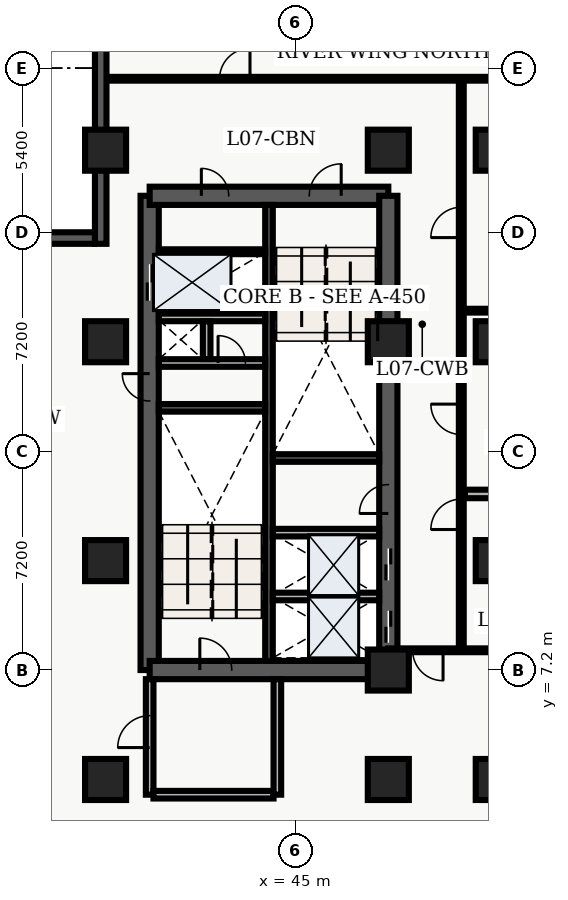
"""IFC4 building model, lengths in metres.
Left out: names, types, materials, properties, quantities, classifications, styles, units other than length and angle.
Written with IfcOpenShell. Run it as: python <this file> out.ifc"""

import sys

from ifc_helpers import new_model, entity, si_unit, converted_unit, direction, frame, origin_with_axes, origin_2d_with_axis, place, context, subcontext, project, spatial, polyline, rectangle, outline, extrude, element, fill, save


model = new_model("IFC4")
c1 = context("Model", 3, precision=1e-05, world=origin_with_axes(), true_north=direction((0.0, 1.0)))
c2 = subcontext(c1, "Body", "Model", "MODEL_VIEW")
j1 = project(units=[si_unit("LENGTHUNIT", "METRE"), converted_unit("PLANEANGLEUNIT", "DEGREE", entity("IfcPlaneAngleMeasure", 0.017), si_unit("PLANEANGLEUNIT", "RADIAN"), dimensions=[0, 0, 0, 0, 0, 0, 0])], contexts=[c1])
p1 = place(None, origin_with_axes())
s1 = spatial("IfcSite", under=j1, at=p1, CompositionType="ELEMENT")
p2 = place(p1, origin_with_axes())
s2 = spatial("IfcBuilding", under=s1, at=p2, CompositionType="ELEMENT")
p3 = place(p2, frame((0.0, 0.0, 32.7), z_axis=(0.0, 0.0, 1.0), x_axis=(1.0, 0.0, 0.0)))
s3 = spatial("IfcBuildingStorey", under=s2, at=p3, CompositionType="ELEMENT", Elevation=32.7)
p4 = place(p3, frame((40.2, 7.2, 0.0), z_axis=(0.0, 0.0, 1.0), x_axis=(0.0, 1.0, 0.0)))
e1 = element("IfcWall", 1, at=p4, inside=s3, PredefinedType="SHEAR", context=c2, shape_type="SweptSolid", body=[
    extrude(outline(polyline([(0.0, -0.3), (15.6, -0.3), (15.6, 0.3), (0.0, 0.3), (0.0, -0.3)])), origin_with_axes(), (0.0, 0.0, 1.0), 3.66),
])
p5 = place(p4, frame((12.75, 0.0, 0.0), z_axis=(0.0, 0.0, 1.0), x_axis=(1.0, 0.0, 0.0)))
e2 = element("IfcOpeningElement", 2, at=p5, cuts=e1, PredefinedType="OPENING", context=c2, shape_type="SweptSolid", body=[
    extrude(rectangle(XDim=1.2, YDim=0.62, at=origin_2d_with_axis()), origin_with_axes(), (0.0, 0.0, 1.0), 2.15),
])
p6 = place(p4, frame((9.3, 0.0, 0.0), z_axis=(0.0, 0.0, 1.0), x_axis=(1.0, 0.0, 0.0)))
e3 = element("IfcOpeningElement", 3, at=p6, cuts=e1, PredefinedType="OPENING", context=c2, shape_type="SweptSolid", body=[
    extrude(rectangle(XDim=0.9, YDim=0.62, at=origin_2d_with_axis()), origin_with_axes(), (0.0, 0.0, 1.0), 2.15),
])
p7 = place(p3, frame((40.2, 7.2, 0.0), z_axis=(0.0, 0.0, 1.0), x_axis=(1.0, 0.0, 0.0)))
e4 = element("IfcWall", 4, at=p7, inside=s3, PredefinedType="SHEAR", context=c2, shape_type="SweptSolid", body=[
    extrude(outline(polyline([(0.0, -0.3), (7.85, -0.3), (7.85, 0.3), (0.0, 0.3), (0.0, -0.3)])), origin_with_axes(), (0.0, 0.0, 1.0), 3.66),
])
p8 = place(p7, frame((2.175, 0.0, 0.0), z_axis=(0.0, 0.0, 1.0), x_axis=(1.0, 0.0, 0.0)))
e5 = element("IfcOpeningElement", 5, at=p8, cuts=e4, PredefinedType="OPENING", context=c2, shape_type="SweptSolid", body=[
    extrude(rectangle(XDim=1.05, YDim=0.62, at=origin_2d_with_axis()), origin_with_axes(), (0.0, 0.0, 1.0), 2.15),
])
p9 = place(p3, frame((40.2, 22.8, 0.0), z_axis=(0.0, 0.0, 1.0), x_axis=(1.0, 0.0, 0.0)))
e6 = element("IfcWall", 6, at=p9, inside=s3, PredefinedType="SHEAR", context=c2, shape_type="SweptSolid", body=[
    extrude(outline(polyline([(0.0, -0.3), (7.85, -0.3), (7.85, 0.3), (0.0, 0.3), (0.0, -0.3)])), origin_with_axes(), (0.0, 0.0, 1.0), 3.66),
])
p10 = place(p9, frame((5.775, 0.0, 0.0), z_axis=(0.0, 0.0, 1.0), x_axis=(1.0, 0.0, 0.0)))
e7 = element("IfcOpeningElement", 7, at=p10, cuts=e6, PredefinedType="OPENING", context=c2, shape_type="SweptSolid", body=[
    extrude(rectangle(XDim=1.05, YDim=0.62, at=origin_2d_with_axis()), origin_with_axes(), (0.0, 0.0, 1.0), 2.15),
])
p11 = place(p9, frame((2.15, 0.0, 0.0), z_axis=(0.0, 0.0, 1.0), x_axis=(1.0, 0.0, 0.0)))
e8 = element("IfcOpeningElement", 8, at=p11, cuts=e6, PredefinedType="OPENING", context=c2, shape_type="SweptSolid", body=[
    extrude(rectangle(XDim=0.9, YDim=0.62, at=origin_2d_with_axis()), origin_with_axes(), (0.0, 0.0, 1.0), 2.15),
])
p12 = place(p3, frame((48.05, 7.2, 0.0), z_axis=(0.0, 0.0, 1.0), x_axis=(0.0, 1.0, 0.0)))
e9 = element("IfcWall", 9, at=p12, inside=s3, PredefinedType="SHEAR", context=c2, shape_type="SweptSolid", body=[
    extrude(outline(polyline([(0.0, -0.3), (15.6, -0.3), (15.6, 0.3), (0.0, 0.3), (0.0, -0.3)])), origin_with_axes(), (0.0, 0.0, 1.0), 3.66),
])
p13 = place(p12, frame((1.425, 0.0, 0.0), z_axis=(0.0, 0.0, 1.0), x_axis=(1.0, 0.0, 0.0)))
e10 = element("IfcOpeningElement", 10, at=p13, cuts=e9, PredefinedType="OPENING", context=c2, shape_type="SweptSolid", body=[
    extrude(rectangle(XDim=1.05, YDim=0.62, at=origin_2d_with_axis()), origin_with_axes(), (0.0, 0.0, 1.0), 2.15),
])
p14 = place(p12, frame((3.475, 0.0, 0.0), z_axis=(0.0, 0.0, 1.0), x_axis=(1.0, 0.0, 0.0)))
e11 = element("IfcOpeningElement", 11, at=p14, cuts=e9, PredefinedType="OPENING", context=c2, shape_type="SweptSolid", body=[
    extrude(rectangle(XDim=1.05, YDim=0.62, at=origin_2d_with_axis()), origin_with_axes(), (0.0, 0.0, 1.0), 2.15),
])
p15 = place(p12, frame((5.625, 0.0, 0.0), z_axis=(0.0, 0.0, 1.0), x_axis=(1.0, 0.0, 0.0)))
e12 = element("IfcOpeningElement", 12, at=p15, cuts=e9, PredefinedType="OPENING", context=c2, shape_type="SweptSolid", body=[
    extrude(rectangle(XDim=0.95, YDim=0.62, at=origin_2d_with_axis()), origin_with_axes(), (0.0, 0.0, 1.0), 2.15),
])
p16 = place(p3, frame((44.125, 7.5, 0.0), z_axis=(0.0, 0.0, 1.0), x_axis=(0.0, 1.0, 0.0)))
e13 = element("IfcWall", 13, at=p16, inside=s3, PredefinedType="SHEAR", context=c2, shape_type="SweptSolid", body=[
    extrude(outline(polyline([(0.0, -0.125), (15.0, -0.125), (15.0, 0.125), (0.0, 0.125), (0.0, -0.125)])), origin_with_axes(), (0.0, 0.0, 1.0), 3.66),
])
for number, where, z_axis, x_axis in (
    (14, (40.5, 15.825, 0.0), (0.0, 0.0, 1.0), (1.0, 0.0, 0.0)),
    (15, (44.25, 14.175, 0.0), (0.0, 0.0, 1.0), (1.0, 0.0, 0.0)),
):
    element("IfcWall", number, at=place(p3, frame(where, z_axis=z_axis, x_axis=x_axis)), inside=s3, PredefinedType="SHEAR", context=c2, shape_type="SweptSolid", body=[
        extrude(outline(polyline([(0.0, -0.125), (3.5, -0.125), (3.5, 0.125), (0.0, 0.125), (0.0, -0.125)])), origin_with_axes(), (0.0, 0.0, 1.0), 3.66),
    ])
p17 = place(p3, frame((40.5, 17.3, 0.0), z_axis=(0.0, 0.0, 1.0), x_axis=(1.0, 0.0, 0.0)))
e16 = element("IfcWall", 16, at=p17, inside=s3, PredefinedType="SOLIDWALL", context=c2, shape_type="SweptSolid", body=[
    extrude(outline(polyline([(0.0, -0.125), (3.5, -0.125), (3.5, 0.125), (0.0, 0.125), (0.0, -0.125)])), origin_with_axes(), (0.0, 0.0, 1.0), 2.7),
])
p18 = place(p17, frame((2.4, 0.0, 0.0), z_axis=(0.0, 0.0, 1.0), x_axis=(1.0, 0.0, 0.0)))
e17 = element("IfcOpeningElement", 17, at=p18, cuts=e16, PredefinedType="OPENING", context=c2, shape_type="SweptSolid", body=[
    extrude(rectangle(XDim=0.9, YDim=0.27, at=origin_2d_with_axis()), origin_with_axes(), (0.0, 0.0, 1.0), 2.15),
])
p19 = place(p3, frame((40.5, 18.8, 0.0), z_axis=(0.0, 0.0, 1.0), x_axis=(1.0, 0.0, 0.0)))
e18 = element("IfcWall", 18, at=p19, inside=s3, PredefinedType="SOLIDWALL", context=c2, shape_type="SweptSolid", body=[
    extrude(outline(polyline([(0.0, -0.125), (3.5, -0.125), (3.5, 0.125), (0.0, 0.125), (0.0, -0.125)])), origin_with_axes(), (0.0, 0.0, 1.0), 2.7),
])
p20 = place(p3, frame((42.075, 17.43, 0.0), z_axis=(0.0, 0.0, 1.0), x_axis=(0.0, 1.0, 0.0)))
e19 = element("IfcWall", 19, at=p20, inside=s3, PredefinedType="SOLIDWALL", context=c2, shape_type="SweptSolid", body=[
    extrude(outline(polyline([(0.0, -0.125), (1.24, -0.125), (1.24, 0.125), (0.0, 0.125), (0.0, -0.125)])), origin_with_axes(), (0.0, 0.0, 1.0), 2.7),
])
p21 = place(p3, frame((40.2, 3.1, 0.0), z_axis=(0.0, 0.0, 1.0), x_axis=(0.0, 1.0, 0.0)))
e20 = element("IfcWall", 20, at=p21, inside=s3, PredefinedType="SOLIDWALL", context=c2, shape_type="SweptSolid", body=[
    extrude(outline(polyline([(0.0, -0.125), (3.8, -0.125), (3.8, 0.125), (0.0, 0.125), (0.0, -0.125)])), origin_with_axes(), (0.0, 0.0, 1.0), 2.7),
])
p22 = place(p21, frame((2.075, 0.0, 0.0), z_axis=(0.0, 0.0, 1.0), x_axis=(1.0, 0.0, 0.0)))
e21 = element("IfcOpeningElement", 21, at=p22, cuts=e20, PredefinedType="OPENING", context=c2, shape_type="SweptSolid", body=[
    extrude(rectangle(XDim=1.05, YDim=0.27, at=origin_2d_with_axis()), origin_with_axes(), (0.0, 0.0, 1.0), 2.15),
])
p23 = place(p3, frame((40.325, 3.1, 0.0), z_axis=(0.0, 0.0, 1.0), x_axis=(1.0, 0.0, 0.0)))
e22 = element("IfcWall", 22, at=p23, inside=s3, PredefinedType="SOLIDWALL", context=c2, shape_type="SweptSolid", body=[
    extrude(outline(polyline([(0.0, -0.125), (3.95, -0.125), (3.95, 0.125), (0.0, 0.125), (0.0, -0.125)])), origin_with_axes(), (0.0, 0.0, 1.0), 2.7),
])
p24 = place(p3, frame((44.4, 3.1, 0.0), z_axis=(0.0, 0.0, 1.0), x_axis=(0.0, 1.0, 0.0)))
e23 = element("IfcWall", 23, at=p24, inside=s3, PredefinedType="SOLIDWALL", context=c2, shape_type="SweptSolid", body=[
    extrude(outline(polyline([(0.0, -0.125), (3.8, -0.125), (3.8, 0.125), (0.0, 0.125), (0.0, -0.125)])), origin_with_axes(), (0.0, 0.0, 1.0), 2.7),
])
for number, where, z_axis, x_axis in (
    (24, (38.75, 3.6, 0.0), (0.0, 0.0, 1.0), (1.0, 0.0, 0.0)),
    (25, (38.75, 10.8, 0.0), (0.0, 0.0, 1.0), (1.0, 0.0, 0.0)),
    (26, (38.75, 18.0, 0.0), (0.0, 0.0, 1.0), (1.0, 0.0, 0.0)),
    (27, (38.75, 24.3, 0.0), (0.0, 0.0, 1.0), (1.0, 0.0, 0.0)),
    (28, (48.05, 3.6, 0.0), (0.0, 0.0, 1.0), (1.0, 0.0, 0.0)),
    (29, (48.05, 7.2, 0.0), (0.0, 0.0, 1.0), (1.0, 0.0, 0.0)),
    (30, (48.05, 18.0, 0.0), (0.0, 0.0, 1.0), (1.0, 0.0, 0.0)),
    (31, (48.05, 24.3, 0.0), (0.0, 0.0, 1.0), (1.0, 0.0, 0.0)),
    (32, (51.6, 3.6, 0.0), (0.0, 0.0, 1.0), (1.0, 0.0, 0.0)),
    (33, (51.6, 10.8, 0.0), (0.0, 0.0, 1.0), (1.0, 0.0, 0.0)),
    (34, (51.6, 18.0, 0.0), (0.0, 0.0, 1.0), (1.0, 0.0, 0.0)),
    (35, (51.6, 24.3, 0.0), (0.0, 0.0, 1.0), (1.0, 0.0, 0.0)),
):
    element("IfcColumn", number, at=place(p3, frame(where, z_axis=z_axis, x_axis=x_axis)), inside=s3, PredefinedType="COLUMN", context=c2, shape_type="SweptSolid", body=[
        extrude(rectangle(XDim=1.35, YDim=1.35, at=origin_2d_with_axis()), origin_with_axes(), (0.0, 0.0, 1.0), 3.9),
    ])
p25 = place(p3, frame((40.5, 20.96, 0.0), z_axis=(0.0, 0.0, 1.0), x_axis=(1.0, 0.0, 0.0)))
e36 = element("IfcWall", 36, at=p25, inside=s3, PredefinedType="PARTITIONING", context=c2, shape_type="SweptSolid", body=[
    extrude(outline(polyline([(0.0, -0.08), (3.5, -0.08), (3.5, 0.08), (0.0, 0.08), (0.0, -0.08)])), origin_with_axes(), (0.0, 0.0, 1.0), 2.7),
])
for number, where, z_axis, x_axis in (
    (37, (44.25, 9.62, 0.0), (0.0, 0.0, 1.0), (1.0, 0.0, 0.0)),
    (38, (44.25, 11.72, 0.0), (0.0, 0.0, 1.0), (1.0, 0.0, 0.0)),
):
    element("IfcWall", number, at=place(p3, frame(where, z_axis=z_axis, x_axis=x_axis)), inside=s3, PredefinedType="SOLIDWALL", context=c2, shape_type="SweptSolid", body=[
        extrude(outline(polyline([(0.0, -0.125), (3.5, -0.125), (3.5, 0.125), (0.0, 0.125), (0.0, -0.125)])), origin_with_axes(), (0.0, 0.0, 1.0), 2.7),
    ])
p26 = place(p3, frame((50.45, 7.85, 0.0), z_axis=(0.0, 0.0, 1.0), x_axis=(0.0, 1.0, 0.0)))
e39 = element("IfcWall", 39, at=p26, inside=s3, PredefinedType="PARTITIONING", context=c2, shape_type="SweptSolid", body=[
    extrude(outline(polyline([(0.0, -0.08), (18.8, -0.08), (18.8, 0.08), (0.0, 0.08), (0.0, -0.08)])), origin_with_axes(), (0.0, 0.0, 1.0), 2.7),
])
p27 = place(p26, frame((4.473, 0.0, 0.0), z_axis=(0.0, 0.0, 1.0), x_axis=(1.0, 0.0, 0.0)))
e40 = element("IfcOpeningElement", 40, at=p27, cuts=e39, PredefinedType="OPENING", context=c2, shape_type="SweptSolid", body=[
    extrude(rectangle(XDim=1.0, YDim=0.18, at=origin_2d_with_axis()), origin_with_axes(), (0.0, 0.0, 1.0), 2.15),
])
p28 = place(p26, frame((7.597, 0.0, 0.0), z_axis=(0.0, 0.0, 1.0), x_axis=(1.0, 0.0, 0.0)))
e41 = element("IfcOpeningElement", 41, at=p28, cuts=e39, PredefinedType="OPENING", context=c2, shape_type="SweptSolid", body=[
    extrude(rectangle(XDim=1.0, YDim=0.18, at=origin_2d_with_axis()), origin_with_axes(), (0.0, 0.0, 1.0), 2.15),
])
p29 = place(p26, frame((14.075, 0.0, 0.0), z_axis=(0.0, 0.0, 1.0), x_axis=(1.0, 0.0, 0.0)))
e42 = element("IfcOpeningElement", 42, at=p29, cuts=e39, PredefinedType="OPENING", context=c2, shape_type="SweptSolid", body=[
    extrude(rectangle(XDim=1.0, YDim=0.18, at=origin_2d_with_axis()), origin_with_axes(), (0.0, 0.0, 1.0), 2.15),
])
p30 = place(p3, frame((59.64, 7.85, 0.0), z_axis=(0.0, 0.0, 1.0), x_axis=(-1.0, 0.0, 0.0)))
e43 = element("IfcWall", 43, at=p30, inside=s3, PredefinedType="PARTITIONING", context=c2, shape_type="SweptSolid", body=[
    extrude(outline(polyline([(0.0, -0.062), (11.59, -0.062), (11.59, 0.062), (0.0, 0.062), (0.0, -0.062)])), origin_with_axes(), (0.0, 0.0, 1.0), 2.7),
])
p31 = place(p30, frame((10.29, 0.0, 0.0), z_axis=(0.0, 0.0, 1.0), x_axis=(1.0, 0.0, 0.0)))
e44 = element("IfcOpeningElement", 44, at=p31, cuts=e43, PredefinedType="OPENING", context=c2, shape_type="SweptSolid", body=[
    extrude(rectangle(XDim=1.0, YDim=0.145, at=origin_2d_with_axis()), origin_with_axes(), (0.0, 0.0, 1.0), 2.15),
])
p32 = place(p3, frame((38.76, 26.65, 0.0), z_axis=(0.0, 0.0, 1.0), x_axis=(1.0, 0.0, 0.0)))
e45 = element("IfcWall", 45, at=p32, inside=s3, PredefinedType="PARTITIONING", context=c2, shape_type="SweptSolid", body=[
    extrude(outline(polyline([(0.0, -0.062), (20.88, -0.062), (20.88, 0.062), (0.0, 0.062), (0.0, -0.062)])), origin_with_axes(), (0.0, 0.0, 1.0), 2.7),
])
p33 = place(p32, frame((4.24, 0.0, 0.0), z_axis=(0.0, 0.0, 1.0), x_axis=(1.0, 0.0, 0.0)))
e46 = element("IfcOpeningElement", 46, at=p33, cuts=e45, PredefinedType="OPENING", context=c2, shape_type="SweptSolid", body=[
    extrude(rectangle(XDim=1.0, YDim=0.145, at=origin_2d_with_axis()), origin_with_axes(), (0.0, 0.0, 1.0), 2.15),
])
p34 = place(p3, frame((50.57, 12.993, 0.0), z_axis=(0.0, 0.0, 1.0), x_axis=(1.0, 0.0, 0.0)))
e47 = element("IfcWall", 47, at=p34, inside=s3, PredefinedType="PARTITIONING", context=c2, shape_type="SweptSolid", body=[
    extrude(outline(polyline([(0.0, -0.14), (9.055, -0.14), (9.055, 0.14), (0.0, 0.14), (0.0, -0.14)])), origin_with_axes(), (0.0, 0.0, 1.0), 2.7),
])
p35 = place(p3, frame((50.57, 19.021, 0.0), z_axis=(0.0, 0.0, 1.0), x_axis=(1.0, 0.0, 0.0)))
e48 = element("IfcWall", 48, at=p35, inside=s3, PredefinedType="PARTITIONING", context=c2, shape_type="SweptSolid", body=[
    extrude(outline(polyline([(0.0, -0.062), (9.055, -0.062), (9.055, 0.062), (0.0, 0.062), (0.0, -0.062)])), origin_with_axes(), (0.0, 0.0, 1.0), 2.7),
])
p36 = place(p3, frame((38.59, 21.22, 0.0), z_axis=(0.0, 0.0, 1.0), x_axis=(0.0, 1.0, 0.0)))
e49 = element("IfcWall", 49, at=p36, inside=s3, PredefinedType="SOLIDWALL", context=c2, shape_type="SweptSolid", body=[
    extrude(outline(polyline([(0.0, -0.19), (7.58, -0.19), (7.58, 0.19), (0.0, 0.19), (0.0, -0.19)])), origin_with_axes(), (0.0, 0.0, 1.0), 3.66),
])
p37 = place(p3, frame((21.22, 21.41, 0.0), z_axis=(0.0, 0.0, 1.0), x_axis=(1.0, 0.0, 0.0)))
e50 = element("IfcWall", 50, at=p37, inside=s3, PredefinedType="SOLIDWALL", context=c2, shape_type="SweptSolid", body=[
    extrude(outline(polyline([(0.0, -0.19), (17.18, -0.19), (17.18, 0.19), (0.0, 0.19), (0.0, -0.19)])), origin_with_axes(), (0.0, 0.0, 1.0), 3.66),
])
p38 = place(p37, frame((3.263, 0.0, 0.45), z_axis=(0.0, 0.0, 1.0), x_axis=(1.0, 0.0, 0.0)))
e51 = element("IfcOpeningElement", 51, at=p38, cuts=e50, PredefinedType="OPENING", context=c2, shape_type="SweptSolid", body=[
    extrude(rectangle(XDim=2.1, YDim=0.4, at=origin_2d_with_axis()), origin_with_axes(), (0.0, 0.0, 1.0), 2.2),
])
p39 = place(p37, frame((8.59, 0.0, 0.45), z_axis=(0.0, 0.0, 1.0), x_axis=(1.0, 0.0, 0.0)))
e52 = element("IfcOpeningElement", 52, at=p39, cuts=e50, PredefinedType="OPENING", context=c2, shape_type="SweptSolid", body=[
    extrude(rectangle(XDim=2.1, YDim=0.4, at=origin_2d_with_axis()), origin_with_axes(), (0.0, 0.0, 1.0), 2.2),
])
p40 = place(p37, frame((13.467, 0.0, 0.45), z_axis=(0.0, 0.0, 1.0), x_axis=(1.0, 0.0, 0.0)))
e53 = element("IfcOpeningElement", 53, at=p40, cuts=e50, PredefinedType="OPENING", context=c2, shape_type="SweptSolid", body=[
    extrude(rectangle(XDim=2.1, YDim=0.4, at=origin_2d_with_axis()), origin_with_axes(), (0.0, 0.0, 1.0), 2.2),
])
p41 = place(p12, frame((1.425, 0.0, 0.0), z_axis=(0.0, 0.0, 1.0), x_axis=(1.0, 0.0, 0.0)))
e54 = element("IfcDoor", 54, at=p41, inside=s3, OperationType="SLIDING_TO_LEFT", PredefinedType="DOOR", context=c2, shape_type="SweptSolid", body=[
    extrude(rectangle(XDim=1.05, YDim=0.09, at=origin_2d_with_axis()), origin_with_axes(), (0.0, 0.0, 1.0), 2.15),
])
fill(e10, e54)
p42 = place(p12, frame((3.475, 0.0, 0.0), z_axis=(0.0, 0.0, 1.0), x_axis=(1.0, 0.0, 0.0)))
e55 = element("IfcDoor", 55, at=p42, inside=s3, OperationType="SLIDING_TO_RIGHT", PredefinedType="DOOR", context=c2, shape_type="SweptSolid", body=[
    extrude(rectangle(XDim=1.05, YDim=0.09, at=origin_2d_with_axis()), origin_with_axes(), (0.0, 0.0, 1.0), 2.15),
])
fill(e11, e55)
p43 = place(p4, frame((12.75, 0.0, 0.0), z_axis=(0.0, 0.0, 1.0), x_axis=(1.0, 0.0, 0.0)))
e56 = element("IfcDoor", 56, at=p43, inside=s3, OperationType="DOUBLE_DOOR_SLIDING", PredefinedType="DOOR", context=c2, shape_type="SweptSolid", body=[
    extrude(rectangle(XDim=1.2, YDim=0.09, at=origin_2d_with_axis()), origin_with_axes(), (0.0, 0.0, 1.0), 2.15),
])
fill(e2, e56)
p44 = place(p4, frame((9.3, 0.0, 0.0), z_axis=(0.0, 0.0, 1.0), x_axis=(1.0, 0.0, 0.0)))
e57 = element("IfcDoor", 57, at=p44, inside=s3, OperationType="SINGLE_SWING_RIGHT", PredefinedType="DOOR", context=c2, shape_type="SweptSolid", body=[
    extrude(rectangle(XDim=0.9, YDim=0.09, at=origin_2d_with_axis()), origin_with_axes(), (0.0, 0.0, 1.0), 2.15),
])
fill(e3, e57)
p45 = place(p17, frame((2.4, 0.0, 0.0), z_axis=(0.0, 0.0, 1.0), x_axis=(1.0, 0.0, 0.0)))
e58 = element("IfcDoor", 58, at=p45, inside=s3, OperationType="SINGLE_SWING_LEFT", PredefinedType="DOOR", context=c2, shape_type="SweptSolid", body=[
    extrude(rectangle(XDim=0.9, YDim=0.09, at=origin_2d_with_axis()), origin_with_axes(), (0.0, 0.0, 1.0), 2.15),
])
fill(e17, e58)
p46 = place(p7, frame((2.175, 0.0, 0.0), z_axis=(0.0, 0.0, 1.0), x_axis=(1.0, 0.0, 0.0)))
e59 = element("IfcDoor", 59, at=p46, inside=s3, OperationType="SINGLE_SWING_LEFT", PredefinedType="DOOR", context=c2, shape_type="SweptSolid", body=[
    extrude(rectangle(XDim=1.05, YDim=0.09, at=origin_2d_with_axis()), origin_with_axes(), (0.0, 0.0, 1.0), 2.15),
])
fill(e5, e59)
p47 = place(p9, frame((5.775, 0.0, 0.0), z_axis=(0.0, 0.0, 1.0), x_axis=(1.0, 0.0, 0.0)))
e60 = element("IfcDoor", 60, at=p47, inside=s3, OperationType="SINGLE_SWING_RIGHT", PredefinedType="DOOR", context=c2, shape_type="SweptSolid", body=[
    extrude(rectangle(XDim=1.05, YDim=0.09, at=origin_2d_with_axis()), origin_with_axes(), (0.0, 0.0, 1.0), 2.15),
])
fill(e7, e60)
p48 = place(p21, frame((2.075, 0.0, 0.0), z_axis=(0.0, 0.0, 1.0), x_axis=(1.0, 0.0, 0.0)))
e61 = element("IfcDoor", 61, at=p48, inside=s3, OperationType="SINGLE_SWING_LEFT", PredefinedType="DOOR", context=c2, shape_type="SweptSolid", body=[
    extrude(rectangle(XDim=1.05, YDim=0.09, at=origin_2d_with_axis()), origin_with_axes(), (0.0, 0.0, 1.0), 2.15),
])
fill(e21, e61)
p49 = place(p9, frame((2.15, 0.0, 0.0), z_axis=(0.0, 0.0, 1.0), x_axis=(1.0, 0.0, 0.0)))
e62 = element("IfcDoor", 62, at=p49, inside=s3, OperationType="SINGLE_SWING_LEFT", PredefinedType="DOOR", context=c2, shape_type="SweptSolid", body=[
    extrude(rectangle(XDim=0.9, YDim=0.09, at=origin_2d_with_axis()), origin_with_axes(), (0.0, 0.0, 1.0), 2.15),
])
fill(e8, e62)
p50 = place(p12, frame((5.625, 0.0, 0.0), z_axis=(0.0, 0.0, 1.0), x_axis=(1.0, 0.0, 0.0)))
e63 = element("IfcDoor", 63, at=p50, inside=s3, OperationType="SINGLE_SWING_LEFT", PredefinedType="DOOR", context=c2, shape_type="SweptSolid", body=[
    extrude(rectangle(XDim=0.95, YDim=0.09, at=origin_2d_with_axis()), origin_with_axes(), (0.0, 0.0, 1.0), 2.15),
])
fill(e12, e63)
p51 = place(p30, frame((10.29, 0.0, 0.0), z_axis=(0.0, 0.0, 1.0), x_axis=(1.0, 0.0, 0.0)))
e64 = element("IfcDoor", 64, at=p51, inside=s3, OperationType="SINGLE_SWING_LEFT", PredefinedType="DOOR", context=c2, shape_type="SweptSolid", body=[
    extrude(rectangle(XDim=1.0, YDim=0.075, at=origin_2d_with_axis()), origin_with_axes(), (0.0, 0.0, 1.0), 2.15),
])
fill(e44, e64)
p52 = place(p32, frame((4.24, 0.0, 0.0), z_axis=(0.0, 0.0, 1.0), x_axis=(1.0, 0.0, 0.0)))
e65 = element("IfcDoor", 65, at=p52, inside=s3, OperationType="SINGLE_SWING_RIGHT", PredefinedType="DOOR", context=c2, shape_type="SweptSolid", body=[
    extrude(rectangle(XDim=1.0, YDim=0.075, at=origin_2d_with_axis()), origin_with_axes(), (0.0, 0.0, 1.0), 2.15),
])
fill(e46, e65)
p53 = place(p26, frame((4.473, 0.0, 0.0), z_axis=(0.0, 0.0, 1.0), x_axis=(1.0, 0.0, 0.0)))
e66 = element("IfcDoor", 66, at=p53, inside=s3, OperationType="SINGLE_SWING_LEFT", PredefinedType="DOOR", context=c2, shape_type="SweptSolid", body=[
    extrude(rectangle(XDim=1.0, YDim=0.09, at=origin_2d_with_axis()), origin_with_axes(), (0.0, 0.0, 1.0), 2.15),
])
fill(e40, e66)
p54 = place(p26, frame((7.597, 0.0, 0.0), z_axis=(0.0, 0.0, 1.0), x_axis=(1.0, 0.0, 0.0)))
e67 = element("IfcDoor", 67, at=p54, inside=s3, OperationType="SINGLE_SWING_RIGHT", PredefinedType="DOOR", context=c2, shape_type="SweptSolid", body=[
    extrude(rectangle(XDim=1.0, YDim=0.09, at=origin_2d_with_axis()), origin_with_axes(), (0.0, 0.0, 1.0), 2.15),
])
fill(e41, e67)
p55 = place(p26, frame((14.075, 0.0, 0.0), z_axis=(0.0, 0.0, 1.0), x_axis=(1.0, 0.0, 0.0)))
e68 = element("IfcDoor", 68, at=p55, inside=s3, OperationType="SINGLE_SWING_LEFT", PredefinedType="DOOR", context=c2, shape_type="SweptSolid", body=[
    extrude(rectangle(XDim=1.0, YDim=0.09, at=origin_2d_with_axis()), origin_with_axes(), (0.0, 0.0, 1.0), 2.15),
])
fill(e42, e68)
save(model, sys.argv[1])
